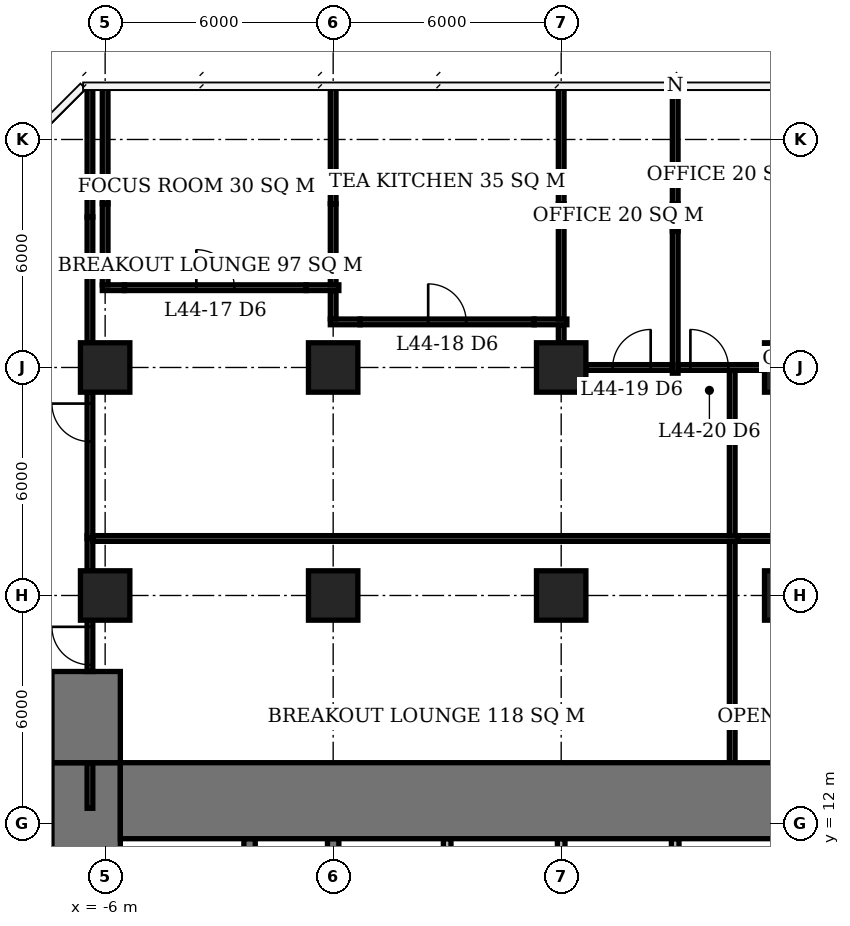
"""IFC4 building model, lengths in metres.
Left out: names, types, materials, properties, quantities, classifications, styles, units other than length and angle.
Written with IfcOpenShell. Run it as: python <this file> out.ifc"""

import sys

from ifc_helpers import new_model, si_unit, direction, frame, frame_2d, origin, origin_2d, place, context, subcontext, project, spatial, rectangle, extrude, element, fill, save


model = new_model("IFC4")
c1 = context("Model", 3, precision=1e-05, world=origin(), true_north=direction((0.0, 1.0)))
c2 = subcontext(c1, "Body", "Model", "MODEL_VIEW")
j1 = project(units=[si_unit("LENGTHUNIT", "METRE"), si_unit("PLANEANGLEUNIT", "RADIAN")], contexts=[c1])
p1 = place(None, origin())
s1 = spatial("IfcSite", under=j1, at=p1, CompositionType="ELEMENT")
p2 = place(p1, origin())
s2 = spatial("IfcBuilding", under=s1, at=p2, CompositionType="ELEMENT")
p3 = place(p2, frame((0.0, 0.0, 181.1)))
s3 = spatial("IfcBuildingStorey", under=s2, at=p3, CompositionType="ELEMENT", Elevation=181.1)
for number, where, z_axis, x_axis in (
    (1, (-6.0, 18.0, 0.0), (0.0, 0.0, 1.0), (1.0, 0.0, 0.0)),
    (2, (-6.0, 24.0, 0.0), (0.0, 0.0, 1.0), (1.0, 0.0, 0.0)),
    (3, (0.0, 18.0, 0.0), (0.0, 0.0, 1.0), (1.0, 0.0, 0.0)),
    (4, (0.0, 24.0, 0.0), (0.0, 0.0, 1.0), (1.0, 0.0, 0.0)),
    (5, (6.0, 18.0, 0.0), (0.0, 0.0, 1.0), (1.0, 0.0, 0.0)),
    (6, (6.0, 24.0, 0.0), (0.0, 0.0, 1.0), (1.0, 0.0, 0.0)),
    (7, (12.0, 18.0, 0.0), (0.0, 0.0, 1.0), (1.0, 0.0, 0.0)),
    (8, (12.0, 24.0, 0.0), (0.0, 0.0, 1.0), (1.0, 0.0, 0.0)),
):
    element("IfcColumn", number, at=place(p3, frame(where, z_axis=z_axis, x_axis=x_axis)), inside=s3, PredefinedType="COLUMN", context=c2, shape_type="SweptSolid", body=[
        extrude(rectangle(XDim=1.3, YDim=1.3, at=origin_2d()), origin(), (0.0, 0.0, 1.0), 3.9),
    ])
p4 = place(p3, frame((-5.6, 12.6, 0.0), z_axis=(0.0, 0.0, 1.0), x_axis=(1.0, 0.0, 0.0)))
e9 = element("IfcWall", 9, at=p4, inside=s3, PredefinedType="SHEAR", context=c2, shape_type="SweptSolid", body=[
    extrude(rectangle(XDim=23.2, YDim=2.0, at=frame_2d((11.6, 0.0))), origin(), (0.0, 0.0, 1.0), 3.9),
])
p5 = place(p3, frame((-6.5, -7.6, 0.0), z_axis=(0.0, 0.0, 1.0), x_axis=(0.0, 1.0, 0.0)))
e10 = element("IfcWall", 10, at=p5, inside=s3, PredefinedType="SHEAR", context=c2, shape_type="SweptSolid", body=[
    extrude(rectangle(XDim=21.2, YDim=1.8, at=frame_2d((10.6, 0.0))), origin(), (0.0, 0.0, 1.0), 3.9),
])
p6 = place(p5, frame((7.8, 0.0, 0.0)))
e11 = element("IfcOpeningElement", 11, at=p6, cuts=e10, PredefinedType="OPENING", context=c2, shape_type="SweptSolid", body=[
    extrude(rectangle(XDim=1.8, YDim=2.4, at=frame_2d((0.9, 1.2))), frame((0.0, 0.91, 0.0), z_axis=(0.0, -1.0, 0.0), x_axis=(1.0, 0.0, 0.0)), (0.0, 0.0, 1.0), 1.82),
])
p7 = place(p3, frame((-6.5, 13.6, 0.0), z_axis=(0.0, 0.0, 1.0), x_axis=(0.0, 1.0, 0.0)))
e12 = element("IfcWall", 12, at=p7, inside=s3, PredefinedType="SHEAR", context=c2, shape_type="SweptSolid", body=[
    extrude(rectangle(XDim=2.4, YDim=1.8, at=frame_2d((1.2, 0.0))), origin(), (0.0, 0.0, 1.0), 3.9),
])
for number, where, z_axis, x_axis in (
    (13, (0.0, 3.15, 0.0), (0.0, 0.0, 1.0), (0.0, 1.0, 0.0)),
    (14, (-2.2, 3.15, 0.0), (0.0, 0.0, 1.0), (0.0, 1.0, 0.0)),
):
    element("IfcWall", number, at=place(p3, frame(where, z_axis=z_axis, x_axis=x_axis)), inside=s3, PredefinedType="SHEAR", context=c2, shape_type="SweptSolid", body=[
        extrude(rectangle(XDim=8.45, YDim=0.3, at=frame_2d((4.225, 0.0))), origin(), (0.0, 0.0, 1.0), 3.9),
    ])
for number, where, z_axis, x_axis in (
    (15, (3.0, 6.15, 0.0), (0.0, 0.0, 1.0), (0.0, 1.0, 0.0)),
    (16, (6.0, 6.15, 0.0), (0.0, 0.0, 1.0), (0.0, 1.0, 0.0)),
    (17, (9.0, 6.15, 0.0), (0.0, 0.0, 1.0), (0.0, 1.0, 0.0)),
):
    element("IfcWall", number, at=place(p3, frame(where, z_axis=z_axis, x_axis=x_axis)), inside=s3, PredefinedType="SOLIDWALL", context=c2, shape_type="SweptSolid", body=[
        extrude(rectangle(XDim=5.45, YDim=0.2, at=frame_2d((2.725, 0.0))), origin(), (0.0, 0.0, 1.0), 3.9),
    ])
p8 = place(p3, frame((6.66, 24.0, 0.0), z_axis=(0.0, 0.0, 1.0), x_axis=(1.0, 0.0, 0.0)))
e18 = element("IfcWall", 18, at=p8, inside=s3, PredefinedType="PARTITIONING", context=c2, shape_type="SweptSolid", body=[
    extrude(rectangle(XDim=2.265, YDim=0.15, at=frame_2d((1.133, 0.0))), origin(), (0.0, 0.0, 1.0), 3.65),
])
p9 = place(p8, frame((0.695, 0.0, 0.0)))
e19 = element("IfcOpeningElement", 19, at=p9, cuts=e18, PredefinedType="OPENING", context=c2, shape_type="SweptSolid", body=[
    extrude(rectangle(XDim=1.0, YDim=2.1, at=frame_2d((0.5, 1.05))), frame((0.0, 0.085, 0.0), z_axis=(0.0, -1.0, 0.0), x_axis=(1.0, 0.0, 0.0)), (0.0, 0.0, 1.0), 0.17),
])
p10 = place(p3, frame((9.075, 24.0, 0.0), z_axis=(0.0, 0.0, 1.0), x_axis=(1.0, 0.0, 0.0)))
e20 = element("IfcWall", 20, at=p10, inside=s3, PredefinedType="PARTITIONING", context=c2, shape_type="SweptSolid", body=[
    extrude(rectangle(XDim=2.265, YDim=0.15, at=frame_2d((1.133, 0.0))), origin(), (0.0, 0.0, 1.0), 3.65),
])
p11 = place(p10, frame((0.325, 0.0, 0.0)))
e21 = element("IfcOpeningElement", 21, at=p11, cuts=e20, PredefinedType="OPENING", context=c2, shape_type="SweptSolid", body=[
    extrude(rectangle(XDim=1.0, YDim=2.1, at=frame_2d((0.5, 1.05))), frame((0.0, 0.085, 0.0), z_axis=(0.0, -1.0, 0.0), x_axis=(1.0, 0.0, 0.0)), (0.0, 0.0, 1.0), 0.17),
])
p12 = place(p3, frame((-0.075, 25.2, 0.0), z_axis=(0.0, 0.0, 1.0), x_axis=(1.0, 0.0, 0.0)))
e22 = element("IfcWall", 22, at=p12, inside=s3, PredefinedType="PARTITIONING", context=c2, shape_type="SweptSolid", body=[
    extrude(rectangle(XDim=0.785, YDim=0.15, at=frame_2d((0.393, 0.0))), origin(), (0.0, 0.0, 1.0), 2.65),
])
p13 = place(p3, frame((0.71, 25.2, 0.0), z_axis=(0.0, 0.0, 1.0), x_axis=(1.0, 0.0, 0.0)))
e23 = element("IfcWall", 23, at=p13, inside=s3, PredefinedType="PARTITIONING", context=c2, shape_type="SweptSolid", body=[
    extrude(rectangle(XDim=4.58, YDim=0.15, at=frame_2d((2.29, 0.0))), origin(), (0.0, 0.0, 1.0), 3.65),
])
p14 = place(p13, frame((1.79, 0.0, 0.0)))
e24 = element("IfcOpeningElement", 24, at=p14, cuts=e23, PredefinedType="OPENING", context=c2, shape_type="SweptSolid", body=[
    extrude(rectangle(XDim=1.0, YDim=2.1, at=frame_2d((0.5, 1.05))), frame((0.0, 0.085, 0.0), z_axis=(0.0, -1.0, 0.0), x_axis=(1.0, 0.0, 0.0)), (0.0, 0.0, 1.0), 0.17),
])
p15 = place(p3, frame((5.29, 25.2, 0.0), z_axis=(0.0, 0.0, 1.0), x_axis=(1.0, 0.0, 0.0)))
e25 = element("IfcWall", 25, at=p15, inside=s3, PredefinedType="PARTITIONING", context=c2, shape_type="SweptSolid", body=[
    extrude(rectangle(XDim=0.86, YDim=0.15, at=frame_2d((0.43, 0.0))), origin(), (0.0, 0.0, 1.0), 2.65),
])
p16 = place(p3, frame((-6.075, 26.1, 0.0), z_axis=(0.0, 0.0, 1.0), x_axis=(1.0, 0.0, 0.0)))
e26 = element("IfcWall", 26, at=p16, inside=s3, PredefinedType="PARTITIONING", context=c2, shape_type="SweptSolid", body=[
    extrude(rectangle(XDim=0.585, YDim=0.15, at=frame_2d((0.292, 0.0))), origin(), (0.0, 0.0, 1.0), 2.65),
])
p17 = place(p3, frame((-5.49, 26.1, 0.0), z_axis=(0.0, 0.0, 1.0), x_axis=(1.0, 0.0, 0.0)))
e27 = element("IfcWall", 27, at=p17, inside=s3, PredefinedType="PARTITIONING", context=c2, shape_type="SweptSolid", body=[
    extrude(rectangle(XDim=4.78, YDim=0.15, at=frame_2d((2.39, 0.0))), origin(), (0.0, 0.0, 1.0), 3.65),
])
p18 = place(p17, frame((1.89, 0.0, 0.0)))
e28 = element("IfcOpeningElement", 28, at=p18, cuts=e27, PredefinedType="OPENING", context=c2, shape_type="SweptSolid", body=[
    extrude(rectangle(XDim=1.0, YDim=2.1, at=frame_2d((0.5, 1.05))), frame((0.0, 0.085, 0.0), z_axis=(0.0, -1.0, 0.0), x_axis=(1.0, 0.0, 0.0)), (0.0, 0.0, 1.0), 0.17),
])
p19 = place(p3, frame((-0.71, 26.1, 0.0), z_axis=(0.0, 0.0, 1.0), x_axis=(1.0, 0.0, 0.0)))
e29 = element("IfcWall", 29, at=p19, inside=s3, PredefinedType="PARTITIONING", context=c2, shape_type="SweptSolid", body=[
    extrude(rectangle(XDim=0.86, YDim=0.15, at=frame_2d((0.43, 0.0))), origin(), (0.0, 0.0, 1.0), 2.65),
])
p20 = place(p3, frame((-6.0, 26.175, 0.0), z_axis=(0.0, 0.0, 1.0), x_axis=(0.0, 1.0, 0.0)))
e30 = element("IfcWall", 30, at=p20, inside=s3, PredefinedType="PARTITIONING", context=c2, shape_type="SweptSolid", body=[
    extrude(rectangle(XDim=2.135, YDim=0.15, at=frame_2d((1.067, 0.0))), origin(), (0.0, 0.0, 1.0), 2.65),
])
p21 = place(p3, frame((-6.0, 28.31, 0.0), z_axis=(0.0, 0.0, 1.0), x_axis=(0.0, 1.0, 0.0)))
e31 = element("IfcWall", 31, at=p21, inside=s3, PredefinedType="PARTITIONING", context=c2, shape_type="SweptSolid", body=[
    extrude(rectangle(XDim=3.09, YDim=0.15, at=frame_2d((1.545, 0.0))), origin(), (0.0, 0.0, 1.0), 3.65),
])
p22 = place(p3, frame((0.0, 25.275, 0.0), z_axis=(0.0, 0.0, 1.0), x_axis=(0.0, 1.0, 0.0)))
e32 = element("IfcWall", 32, at=p22, inside=s3, PredefinedType="PARTITIONING", context=c2, shape_type="SweptSolid", body=[
    extrude(rectangle(XDim=0.75, YDim=0.15, at=frame_2d((0.375, 0.0))), origin(), (0.0, 0.0, 1.0), 2.65),
])
p23 = place(p3, frame((0.0, 26.175, 0.0), z_axis=(0.0, 0.0, 1.0), x_axis=(0.0, 1.0, 0.0)))
e33 = element("IfcWall", 33, at=p23, inside=s3, PredefinedType="PARTITIONING", context=c2, shape_type="SweptSolid", body=[
    extrude(rectangle(XDim=2.135, YDim=0.15, at=frame_2d((1.067, 0.0))), origin(), (0.0, 0.0, 1.0), 2.65),
])
p24 = place(p3, frame((0.0, 28.31, 0.0), z_axis=(0.0, 0.0, 1.0), x_axis=(0.0, 1.0, 0.0)))
e34 = element("IfcWall", 34, at=p24, inside=s3, PredefinedType="PARTITIONING", context=c2, shape_type="SweptSolid", body=[
    extrude(rectangle(XDim=3.09, YDim=0.15, at=frame_2d((1.545, 0.0))), origin(), (0.0, 0.0, 1.0), 3.65),
])
p25 = place(p3, frame((6.0, 24.65, 0.0), z_axis=(0.0, 0.0, 1.0), x_axis=(0.0, 1.0, 0.0)))
e35 = element("IfcWall", 35, at=p25, inside=s3, PredefinedType="PARTITIONING", context=c2, shape_type="SweptSolid", body=[
    extrude(rectangle(XDim=0.475, YDim=0.15, at=frame_2d((0.238, 0.0))), origin(), (0.0, 0.0, 1.0), 2.65),
])
p26 = place(p3, frame((6.0, 25.275, 0.0), z_axis=(0.0, 0.0, 1.0), x_axis=(0.0, 1.0, 0.0)))
e36 = element("IfcWall", 36, at=p26, inside=s3, PredefinedType="PARTITIONING", context=c2, shape_type="SweptSolid", body=[
    extrude(rectangle(XDim=3.035, YDim=0.15, at=frame_2d((1.518, 0.0))), origin(), (0.0, 0.0, 1.0), 2.65),
])
p27 = place(p3, frame((6.0, 28.31, 0.0), z_axis=(0.0, 0.0, 1.0), x_axis=(0.0, 1.0, 0.0)))
e37 = element("IfcWall", 37, at=p27, inside=s3, PredefinedType="PARTITIONING", context=c2, shape_type="SweptSolid", body=[
    extrude(rectangle(XDim=3.04, YDim=0.15, at=frame_2d((1.52, 0.0))), origin(), (0.0, 0.0, 1.0), 3.65),
])
p28 = place(p3, frame((9.0, 23.85, 0.0), z_axis=(0.0, 0.0, 1.0), x_axis=(0.0, 1.0, 0.0)))
e38 = element("IfcWall", 38, at=p28, inside=s3, PredefinedType="PARTITIONING", context=c2, shape_type="SweptSolid", body=[
    extrude(rectangle(XDim=3.74, YDim=0.15, at=frame_2d((1.87, 0.0))), origin(), (0.0, 0.0, 1.0), 3.65),
])
p29 = place(p3, frame((9.0, 27.59, 0.0), z_axis=(0.0, 0.0, 1.0), x_axis=(0.0, 1.0, 0.0)))
e39 = element("IfcWall", 39, at=p29, inside=s3, PredefinedType="PARTITIONING", context=c2, shape_type="SweptSolid", body=[
    extrude(rectangle(XDim=0.72, YDim=0.15, at=frame_2d((0.36, 0.0))), origin(), (0.0, 0.0, 1.0), 2.65),
])
p30 = place(p3, frame((9.0, 28.31, 0.0), z_axis=(0.0, 0.0, 1.0), x_axis=(0.0, 1.0, 0.0)))
e40 = element("IfcWall", 40, at=p30, inside=s3, PredefinedType="PARTITIONING", context=c2, shape_type="SweptSolid", body=[
    extrude(rectangle(XDim=3.04, YDim=0.15, at=frame_2d((1.52, 0.0))), origin(), (0.0, 0.0, 1.0), 3.65),
])
p31 = place(p3, frame((-6.4, 12.4, 0.0), z_axis=(0.0, 0.0, 1.0), x_axis=(0.0, 1.0, 0.0)))
e41 = element("IfcWall", 41, at=p31, inside=s3, PredefinedType="PARTITIONING", context=c2, shape_type="SweptSolid", body=[
    extrude(rectangle(XDim=1.2, YDim=0.15, at=frame_2d((0.6, 0.0))), origin(), (0.0, 0.0, 1.0), 3.65),
])
p32 = place(p3, frame((-6.4, 16.0, 0.0), z_axis=(0.0, 0.0, 1.0), x_axis=(0.0, 1.0, 0.0)))
e42 = element("IfcWall", 42, at=p32, inside=s3, PredefinedType="PARTITIONING", context=c2, shape_type="SweptSolid", body=[
    extrude(rectangle(XDim=1.35, YDim=0.15, at=frame_2d((0.675, 0.0))), origin(), (0.0, 0.0, 1.0), 3.65),
])
p33 = place(p32, frame((0.175, 0.0, 0.0)))
e43 = element("IfcOpeningElement", 43, at=p33, cuts=e42, PredefinedType="OPENING", context=c2, shape_type="SweptSolid", body=[
    extrude(rectangle(XDim=1.0, YDim=2.1, at=frame_2d((0.5, 1.05))), frame((0.0, 0.085, 0.0), z_axis=(0.0, -1.0, 0.0), x_axis=(1.0, 0.0, 0.0)), (0.0, 0.0, 1.0), 0.17),
])
p34 = place(p3, frame((-6.4, 18.65, 0.0), z_axis=(0.0, 0.0, 1.0), x_axis=(0.0, 1.0, 0.0)))
e44 = element("IfcWall", 44, at=p34, inside=s3, PredefinedType="PARTITIONING", context=c2, shape_type="SweptSolid", body=[
    extrude(rectangle(XDim=0.925, YDim=0.15, at=frame_2d((0.462, 0.0))), origin(), (0.0, 0.0, 1.0), 3.65),
])
p35 = place(p3, frame((-6.4, 19.5, 0.0), z_axis=(0.0, 0.0, 1.0), x_axis=(0.0, 1.0, 0.0)))
e45 = element("IfcWall", 45, at=p35, inside=s3, PredefinedType="PARTITIONING", context=c2, shape_type="SweptSolid", body=[
    extrude(rectangle(XDim=3.85, YDim=0.15, at=frame_2d((1.925, 0.0))), origin(), (0.0, 0.0, 1.0), 3.65),
])
p36 = place(p35, frame((2.55, 0.0, 0.0)))
e46 = element("IfcOpeningElement", 46, at=p36, cuts=e45, PredefinedType="OPENING", context=c2, shape_type="SweptSolid", body=[
    extrude(rectangle(XDim=1.0, YDim=2.1, at=frame_2d((0.5, 1.05))), frame((0.0, 0.085, 0.0), z_axis=(0.0, -1.0, 0.0), x_axis=(1.0, 0.0, 0.0)), (0.0, 0.0, 1.0), 0.17),
])
p37 = place(p3, frame((-6.4, 24.65, 0.0), z_axis=(0.0, 0.0, 1.0), x_axis=(0.0, 1.0, 0.0)))
e47 = element("IfcWall", 47, at=p37, inside=s3, PredefinedType="PARTITIONING", context=c2, shape_type="SweptSolid", body=[
    extrude(rectangle(XDim=3.31, YDim=0.15, at=frame_2d((1.655, 0.0))), origin(), (0.0, 0.0, 1.0), 2.65),
])
p38 = place(p3, frame((-6.4, 27.96, 0.0), z_axis=(0.0, 0.0, 1.0), x_axis=(0.0, 1.0, 0.0)))
e48 = element("IfcWall", 48, at=p38, inside=s3, PredefinedType="PARTITIONING", context=c2, shape_type="SweptSolid", body=[
    extrude(rectangle(XDim=3.44, YDim=0.15, at=frame_2d((1.72, 0.0))), origin(), (0.0, 0.0, 1.0), 3.65),
])
p39 = place(p3, frame((-6.325, 19.5, 0.0), z_axis=(0.0, 0.0, 1.0), x_axis=(1.0, 0.0, 0.0)))
e49 = element("IfcWall", 49, at=p39, inside=s3, PredefinedType="PARTITIONING", context=c2, shape_type="SweptSolid", body=[
    extrude(rectangle(XDim=16.975, YDim=0.15, at=frame_2d((8.487, 0.0))), origin(), (0.0, 0.0, 1.0), 3.65),
])
p40 = place(p3, frame((10.5, 12.4, 0.0), z_axis=(0.0, 0.0, 1.0), x_axis=(0.0, 1.0, 0.0)))
e50 = element("IfcWall", 50, at=p40, inside=s3, PredefinedType="PARTITIONING", context=c2, shape_type="SweptSolid", body=[
    extrude(rectangle(XDim=7.025, YDim=0.15, at=frame_2d((3.513, 0.0))), origin(), (0.0, 0.0, 1.0), 3.65),
])
p41 = place(p3, frame((10.5, 19.575, 0.0), z_axis=(0.0, 0.0, 1.0), x_axis=(0.0, 1.0, 0.0)))
e51 = element("IfcWall", 51, at=p41, inside=s3, PredefinedType="PARTITIONING", context=c2, shape_type="SweptSolid", body=[
    extrude(rectangle(XDim=4.35, YDim=0.15, at=frame_2d((2.175, 0.0))), origin(), (0.0, 0.0, 1.0), 3.65),
])
p42 = place(p3, frame((10.65, 19.5, 0.0), z_axis=(0.0, 0.0, 1.0), x_axis=(1.0, 0.0, 0.0)))
e52 = element("IfcWall", 52, at=p42, inside=s3, PredefinedType="PARTITIONING", context=c2, shape_type="SweptSolid", body=[
    extrude(rectangle(XDim=7.9, YDim=0.15, at=frame_2d((3.95, 0.0))), origin(), (0.0, 0.0, 1.0), 3.65),
])
p43 = place(p18, origin())
e53 = element("IfcDoor", 53, at=p43, inside=s3, OperationType="SINGLE_SWING_LEFT", PredefinedType="DOOR", context=c2, shape_type="SweptSolid", body=[
    extrude(rectangle(XDim=1.0, YDim=2.1, at=frame_2d((0.5, 1.05))), frame((0.0, 0.025, 0.0), z_axis=(0.0, -1.0, 0.0), x_axis=(1.0, 0.0, 0.0)), (0.0, 0.0, 1.0), 0.05),
])
fill(e28, e53)
p44 = place(p14, origin())
e54 = element("IfcDoor", 54, at=p44, inside=s3, OperationType="SINGLE_SWING_LEFT", PredefinedType="DOOR", context=c2, shape_type="SweptSolid", body=[
    extrude(rectangle(XDim=1.0, YDim=2.1, at=frame_2d((0.5, 1.05))), frame((0.0, 0.025, 0.0), z_axis=(0.0, -1.0, 0.0), x_axis=(1.0, 0.0, 0.0)), (0.0, 0.0, 1.0), 0.05),
])
fill(e24, e54)
p45 = place(p9, origin())
e55 = element("IfcDoor", 55, at=p45, inside=s3, OperationType="SINGLE_SWING_RIGHT", PredefinedType="DOOR", context=c2, shape_type="SweptSolid", body=[
    extrude(rectangle(XDim=1.0, YDim=2.1, at=frame_2d((0.5, 1.05))), frame((0.0, 0.025, 0.0), z_axis=(0.0, -1.0, 0.0), x_axis=(1.0, 0.0, 0.0)), (0.0, 0.0, 1.0), 0.05),
])
fill(e19, e55)
p46 = place(p11, origin())
e56 = element("IfcDoor", 56, at=p46, inside=s3, OperationType="SINGLE_SWING_LEFT", PredefinedType="DOOR", context=c2, shape_type="SweptSolid", body=[
    extrude(rectangle(XDim=1.0, YDim=2.1, at=frame_2d((0.5, 1.05))), frame((0.0, 0.025, 0.0), z_axis=(0.0, -1.0, 0.0), x_axis=(1.0, 0.0, 0.0)), (0.0, 0.0, 1.0), 0.05),
])
fill(e21, e56)
p47 = place(p36, origin())
e57 = element("IfcDoor", 57, at=p47, inside=s3, OperationType="SINGLE_SWING_RIGHT", PredefinedType="DOOR", context=c2, shape_type="SweptSolid", body=[
    extrude(rectangle(XDim=1.0, YDim=2.1, at=frame_2d((0.5, 1.05))), frame((0.0, 0.025, 0.0), z_axis=(0.0, -1.0, 0.0), x_axis=(1.0, 0.0, 0.0)), (0.0, 0.0, 1.0), 0.05),
])
fill(e46, e57)
p48 = place(p33, origin())
e58 = element("IfcDoor", 58, at=p48, inside=s3, OperationType="SINGLE_SWING_RIGHT", PredefinedType="DOOR", context=c2, shape_type="SweptSolid", body=[
    extrude(rectangle(XDim=1.0, YDim=2.1, at=frame_2d((0.5, 1.05))), frame((0.0, 0.025, 0.0), z_axis=(0.0, -1.0, 0.0), x_axis=(1.0, 0.0, 0.0)), (0.0, 0.0, 1.0), 0.05),
])
fill(e43, e58)
save(model, sys.argv[1])
